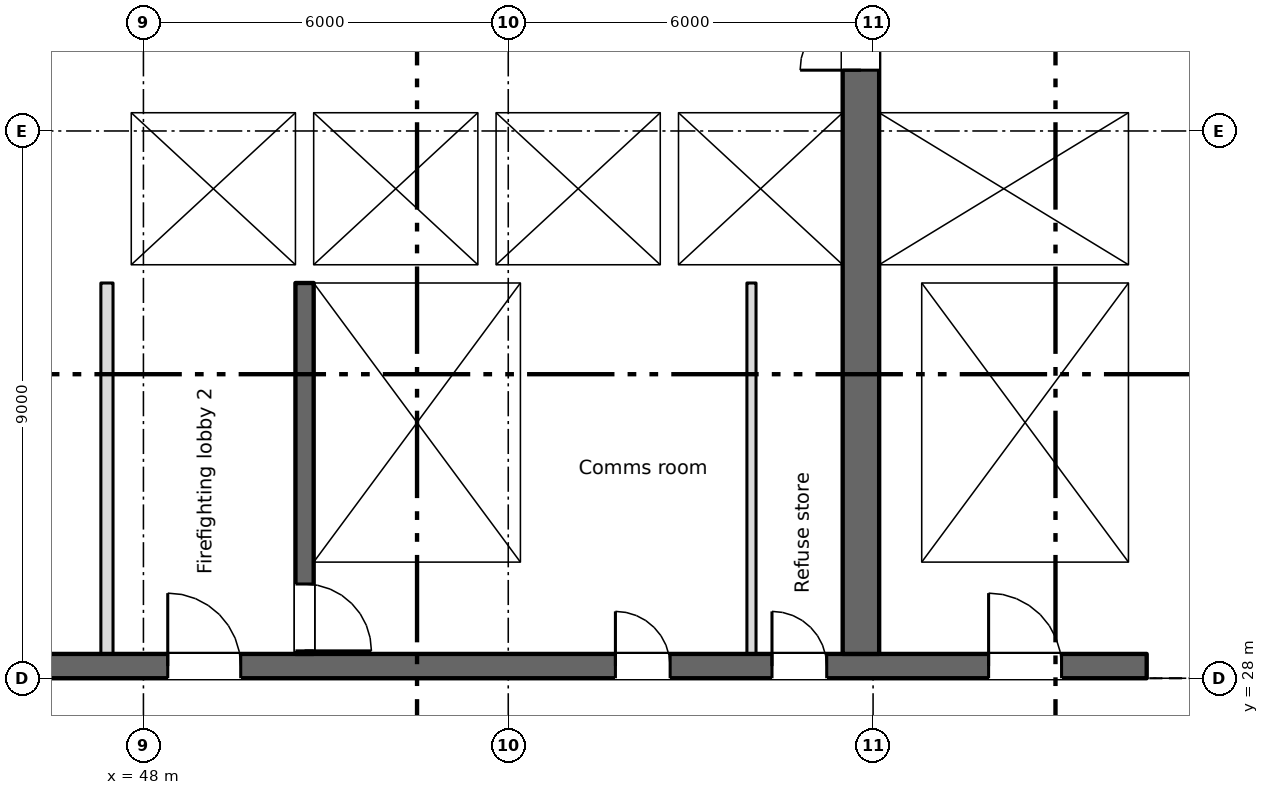
"""IFC4 building model, lengths in metres.
Left out: names, types, materials, properties, quantities, classifications, styles, units other than length and angle.
Written with IfcOpenShell. Run it as: python <this file> out.ifc"""

import sys

from ifc_helpers import new_model, si_unit, direction, frame, frame_2d, origin, place, context, subcontext, project, spatial, rectangle, extrude, element, fill, save


model = new_model("IFC4")
c1 = context("Model", 3, precision=1e-05, world=origin(), true_north=direction((0.0, 1.0)))
c2 = subcontext(c1, "Body", "Model", "MODEL_VIEW")
j1 = project(units=[si_unit("LENGTHUNIT", "METRE"), si_unit("PLANEANGLEUNIT", "RADIAN")], contexts=[c1])
p1 = place(None, origin())
s1 = spatial("IfcSite", under=j1, at=p1, CompositionType="ELEMENT")
p2 = place(p1, origin())
s2 = spatial("IfcBuilding", under=s1, at=p2, CompositionType="ELEMENT")
p3 = place(p2, frame((0.0, 0.0, 262.15)))
s3 = spatial("IfcBuildingStorey", under=s2, at=p3, CompositionType="ELEMENT", Elevation=262.15)
p4 = place(p3, frame((6.5, 28.2, 0.0), z_axis=(0.0, 0.0, 1.0), x_axis=(1.0, 0.0, 0.0)))
e1 = element("IfcWall", 1, at=p4, inside=s3, PredefinedType="SHEAR", context=c2, shape_type="SweptSolid", body=[
    extrude(rectangle(XDim=58.0, YDim=0.4, at=frame_2d((29.0, 0.0))), origin(), (0.0, 0.0, 1.0), 3.2),
])
p5 = place(p4, frame((12.262, 0.0, 0.0)))
e2 = element("IfcOpeningElement", 2, at=p5, cuts=e1, PredefinedType="OPENING", context=c2, shape_type="SweptSolid", body=[
    extrude(rectangle(XDim=0.9, YDim=2.1, at=frame_2d((0.45, 1.05))), frame((0.0, 0.21, 0.0), z_axis=(0.0, -1.0, 0.0), x_axis=(1.0, 0.0, 0.0)), (0.0, 0.0, 1.0), 0.42),
])
p6 = place(p4, frame((14.837, 0.0, 0.0)))
e3 = element("IfcOpeningElement", 3, at=p6, cuts=e1, PredefinedType="OPENING", context=c2, shape_type="SweptSolid", body=[
    extrude(rectangle(XDim=0.9, YDim=2.1, at=frame_2d((0.45, 1.05))), frame((0.0, 0.21, 0.0), z_axis=(0.0, -1.0, 0.0), x_axis=(1.0, 0.0, 0.0)), (0.0, 0.0, 1.0), 0.42),
])
p7 = place(p4, frame((49.262, 0.0, 0.0)))
e4 = element("IfcOpeningElement", 4, at=p7, cuts=e1, PredefinedType="OPENING", context=c2, shape_type="SweptSolid", body=[
    extrude(rectangle(XDim=0.9, YDim=2.1, at=frame_2d((0.45, 1.05))), frame((0.0, 0.21, 0.0), z_axis=(0.0, -1.0, 0.0), x_axis=(1.0, 0.0, 0.0)), (0.0, 0.0, 1.0), 0.42),
])
p8 = place(p4, frame((51.837, 0.0, 0.0)))
e5 = element("IfcOpeningElement", 5, at=p8, cuts=e1, PredefinedType="OPENING", context=c2, shape_type="SweptSolid", body=[
    extrude(rectangle(XDim=0.9, YDim=2.1, at=frame_2d((0.45, 1.05))), frame((0.0, 0.21, 0.0), z_axis=(0.0, -1.0, 0.0), x_axis=(1.0, 0.0, 0.0)), (0.0, 0.0, 1.0), 0.42),
])
p9 = place(p4, frame((1.55, 0.0, 0.0)))
e6 = element("IfcOpeningElement", 6, at=p9, cuts=e1, PredefinedType="OPENING", context=c2, shape_type="SweptSolid", body=[
    extrude(rectangle(XDim=0.9, YDim=2.1, at=frame_2d((0.45, 1.05))), frame((0.0, 0.21, 0.0), z_axis=(0.0, -1.0, 0.0), x_axis=(1.0, 0.0, 0.0)), (0.0, 0.0, 1.0), 0.42),
])
p10 = place(p4, frame((4.9, 0.0, 0.0)))
e7 = element("IfcOpeningElement", 7, at=p10, cuts=e1, PredefinedType="OPENING", context=c2, shape_type="SweptSolid", body=[
    extrude(rectangle(XDim=1.2, YDim=2.1, at=frame_2d((0.6, 1.05))), frame((0.0, 0.21, 0.0), z_axis=(0.0, -1.0, 0.0), x_axis=(1.0, 0.0, 0.0)), (0.0, 0.0, 1.0), 0.42),
])
p11 = place(p4, frame((31.9, 0.0, 0.0)))
e8 = element("IfcOpeningElement", 8, at=p11, cuts=e1, PredefinedType="OPENING", context=c2, shape_type="SweptSolid", body=[
    extrude(rectangle(XDim=1.2, YDim=2.1, at=frame_2d((0.6, 1.05))), frame((0.0, 0.21, 0.0), z_axis=(0.0, -1.0, 0.0), x_axis=(1.0, 0.0, 0.0)), (0.0, 0.0, 1.0), 0.42),
])
p12 = place(p4, frame((55.4, 0.0, 0.0)))
e9 = element("IfcOpeningElement", 9, at=p12, cuts=e1, PredefinedType="OPENING", context=c2, shape_type="SweptSolid", body=[
    extrude(rectangle(XDim=1.2, YDim=2.1, at=frame_2d((0.6, 1.05))), frame((0.0, 0.21, 0.0), z_axis=(0.0, -1.0, 0.0), x_axis=(1.0, 0.0, 0.0)), (0.0, 0.0, 1.0), 0.42),
])
p13 = place(p4, frame((21.9, 0.0, 0.0)))
e10 = element("IfcOpeningElement", 10, at=p13, cuts=e1, PredefinedType="OPENING", context=c2, shape_type="SweptSolid", body=[
    extrude(rectangle(XDim=1.2, YDim=2.1, at=frame_2d((0.6, 1.05))), frame((0.0, 0.21, 0.0), z_axis=(0.0, -1.0, 0.0), x_axis=(1.0, 0.0, 0.0)), (0.0, 0.0, 1.0), 0.42),
])
p14 = place(p4, frame((41.9, 0.0, 0.0)))
e11 = element("IfcOpeningElement", 11, at=p14, cuts=e1, PredefinedType="OPENING", context=c2, shape_type="SweptSolid", body=[
    extrude(rectangle(XDim=1.2, YDim=2.1, at=frame_2d((0.6, 1.05))), frame((0.0, 0.21, 0.0), z_axis=(0.0, -1.0, 0.0), x_axis=(1.0, 0.0, 0.0)), (0.0, 0.0, 1.0), 0.42),
])
p15 = place(p4, frame((25.05, 0.0, 0.0)))
e12 = element("IfcOpeningElement", 12, at=p15, cuts=e1, PredefinedType="OPENING", context=c2, shape_type="SweptSolid", body=[
    extrude(rectangle(XDim=2.4, YDim=2.1, at=frame_2d((1.2, 1.05))), frame((0.0, 0.21, 0.0), z_axis=(0.0, -1.0, 0.0), x_axis=(1.0, 0.0, 0.0)), (0.0, 0.0, 1.0), 0.42),
])
p16 = place(p4, frame((37.55, 0.0, 0.0)))
e13 = element("IfcOpeningElement", 13, at=p16, cuts=e1, PredefinedType="OPENING", context=c2, shape_type="SweptSolid", body=[
    extrude(rectangle(XDim=2.4, YDim=2.1, at=frame_2d((1.2, 1.05))), frame((0.0, 0.21, 0.0), z_axis=(0.0, -1.0, 0.0), x_axis=(1.0, 0.0, 0.0)), (0.0, 0.0, 1.0), 0.42),
])
p17 = place(p4, frame((8.25, 0.0, 0.0)))
e14 = element("IfcOpeningElement", 14, at=p17, cuts=e1, PredefinedType="OPENING", context=c2, shape_type="SweptSolid", body=[
    extrude(rectangle(XDim=2.4, YDim=2.1, at=frame_2d((1.2, 1.05))), frame((0.0, 0.21, 0.0), z_axis=(0.0, -1.0, 0.0), x_axis=(1.0, 0.0, 0.0)), (0.0, 0.0, 1.0), 0.42),
])
p18 = place(p4, frame((29.05, 0.0, 0.0)))
e15 = element("IfcOpeningElement", 15, at=p18, cuts=e1, PredefinedType="OPENING", context=c2, shape_type="SweptSolid", body=[
    extrude(rectangle(XDim=0.9, YDim=2.1, at=frame_2d((0.45, 1.05))), frame((0.0, 0.21, 0.0), z_axis=(0.0, -1.0, 0.0), x_axis=(1.0, 0.0, 0.0)), (0.0, 0.0, 1.0), 0.42),
])
p19 = place(p4, frame((35.05, 0.0, 0.0)))
e16 = element("IfcOpeningElement", 16, at=p19, cuts=e1, PredefinedType="OPENING", context=c2, shape_type="SweptSolid", body=[
    extrude(rectangle(XDim=0.9, YDim=2.1, at=frame_2d((0.45, 1.05))), frame((0.0, 0.21, 0.0), z_axis=(0.0, -1.0, 0.0), x_axis=(1.0, 0.0, 0.0)), (0.0, 0.0, 1.0), 0.42),
])
p20 = place(p3, frame((64.35, 34.8, 0.0), z_axis=(0.0, 0.0, 1.0), x_axis=(0.0, 1.0, 0.0)))
e17 = element("IfcWall", 17, at=p20, inside=s3, PredefinedType="SHEAR", context=c2, shape_type="SweptSolid", body=[
    extrude(rectangle(XDim=6.45, YDim=0.3, at=frame_2d((3.225, 0.0))), origin(), (0.0, 0.0, 1.0), 3.2),
])
p21 = place(p3, frame((59.8, 28.4, 0.0), z_axis=(0.0, 0.0, 1.0), x_axis=(0.0, 1.0, 0.0)))
e18 = element("IfcWall", 18, at=p21, inside=s3, PredefinedType="SHEAR", context=c2, shape_type="SweptSolid", body=[
    extrude(rectangle(XDim=15.1, YDim=0.6, at=frame_2d((7.55, 0.0))), origin(), (0.0, 0.0, 1.0), 3.2),
])
p22 = place(p21, frame((9.6, 0.0, 0.0)))
e19 = element("IfcOpeningElement", 19, at=p22, cuts=e18, PredefinedType="OPENING", context=c2, shape_type="SweptSolid", body=[
    extrude(rectangle(XDim=2.0, YDim=2.1, at=frame_2d((1.0, 1.05))), frame((0.0, 0.31, 0.0), z_axis=(0.0, -1.0, 0.0), x_axis=(1.0, 0.0, 0.0)), (0.0, 0.0, 1.0), 0.62),
])
p23 = place(p3, frame((50.65, 34.5, 0.0), z_axis=(0.0, 0.0, 1.0), x_axis=(0.0, -1.0, 0.0)))
e20 = element("IfcWall", 20, at=p23, inside=s3, PredefinedType="SHEAR", context=c2, shape_type="SweptSolid", body=[
    extrude(rectangle(XDim=6.1, YDim=0.3, at=frame_2d((3.05, 0.0))), origin(), (0.0, 0.0, 1.0), 3.2),
])
p24 = place(p23, frame((4.95, 0.0, 0.0)))
e21 = element("IfcOpeningElement", 21, at=p24, cuts=e20, PredefinedType="OPENING", context=c2, shape_type="SweptSolid", body=[
    extrude(rectangle(XDim=1.1, YDim=2.1, at=frame_2d((0.55, 1.05))), frame((0.0, 0.16, 0.0), z_axis=(0.0, -1.0, 0.0), x_axis=(1.0, 0.0, 0.0)), (0.0, 0.0, 1.0), 0.32),
])
p25 = place(p3, frame((54.35, 28.4, 0.0), z_axis=(0.0, 0.0, 1.0), x_axis=(0.0, 1.0, 0.0)))
e22 = element("IfcWall", 22, at=p25, inside=s3, PredefinedType="SHEAR", context=c2, shape_type="SweptSolid", body=[
    extrude(rectangle(XDim=6.1, YDim=0.3, at=frame_2d((3.05, 0.0))), origin(), (0.0, 0.0, 1.0), 3.2),
])
p26 = place(p3, frame((60.45, 28.4, 0.0), z_axis=(0.0, 0.0, 1.0), x_axis=(0.0, 1.0, 0.0)))
e23 = element("IfcWall", 23, at=p26, inside=s3, PredefinedType="SHEAR", context=c2, shape_type="SweptSolid", body=[
    extrude(rectangle(XDim=6.1, YDim=0.7, at=frame_2d((3.05, 0.0))), origin(), (0.0, 0.0, 1.0), 3.2),
])
p27 = place(p3, frame((64.35, 28.4, 0.0), z_axis=(0.0, 0.0, 1.0), x_axis=(0.0, 1.0, 0.0)))
e24 = element("IfcWall", 24, at=p27, inside=s3, PredefinedType="SHEAR", context=c2, shape_type="SweptSolid", body=[
    extrude(rectangle(XDim=6.1, YDim=0.3, at=frame_2d((3.05, 0.0))), origin(), (0.0, 0.0, 1.0), 3.2),
])
p28 = place(p3, frame((47.3, 34.65, 0.0), z_axis=(0.0, 0.0, 1.0), x_axis=(1.0, 0.0, 0.0)))
e25 = element("IfcWall", 25, at=p28, inside=s3, PredefinedType="SHEAR", context=c2, shape_type="SweptSolid", body=[
    extrude(rectangle(XDim=12.2, YDim=0.3, at=frame_2d((6.1, 0.0))), origin(), (0.0, 0.0, 1.0), 3.2),
])
p29 = place(p28, frame((1.3, 0.0, 0.0)))
e26 = element("IfcOpeningElement", 26, at=p29, cuts=e25, PredefinedType="OPENING", context=c2, shape_type="SweptSolid", body=[
    extrude(rectangle(XDim=1.1, YDim=2.1, at=frame_2d((0.55, 1.05))), frame((0.0, 0.16, 0.0), z_axis=(0.0, -1.0, 0.0), x_axis=(1.0, 0.0, 0.0)), (0.0, 0.0, 1.0), 0.32),
])
p30 = place(p3, frame((60.1, 34.65, 0.0), z_axis=(0.0, 0.0, 1.0), x_axis=(1.0, 0.0, 0.0)))
e27 = element("IfcWall", 27, at=p30, inside=s3, PredefinedType="SHEAR", context=c2, shape_type="SweptSolid", body=[
    extrude(rectangle(XDim=4.4, YDim=0.3, at=frame_2d((2.2, 0.0))), origin(), (0.0, 0.0, 1.0), 3.2),
])
p31 = place(p3, frame((47.3, 37.45, 0.0), z_axis=(0.0, 0.0, 1.0), x_axis=(1.0, 0.0, 0.0)))
e28 = element("IfcWall", 28, at=p31, inside=s3, PredefinedType="SHEAR", context=c2, shape_type="SweptSolid", body=[
    extrude(rectangle(XDim=12.2, YDim=0.3, at=frame_2d((6.1, 0.0))), origin(), (0.0, 0.0, 1.0), 3.2),
])
p32 = place(p31, frame((4.3, 0.0, 0.0)))
e29 = element("IfcOpeningElement", 29, at=p32, cuts=e28, PredefinedType="OPENING", context=c2, shape_type="SweptSolid", body=[
    extrude(rectangle(XDim=1.1, YDim=2.1, at=frame_2d((0.55, 1.05))), frame((0.0, 0.16, 0.0), z_axis=(0.0, -1.0, 0.0), x_axis=(1.0, 0.0, 0.0)), (0.0, 0.0, 1.0), 0.32),
])
p33 = place(p31, frame((7.3, 0.0, 0.0)))
e30 = element("IfcOpeningElement", 30, at=p33, cuts=e28, PredefinedType="OPENING", context=c2, shape_type="SweptSolid", body=[
    extrude(rectangle(XDim=1.1, YDim=2.1, at=frame_2d((0.55, 1.05))), frame((0.0, 0.16, 0.0), z_axis=(0.0, -1.0, 0.0), x_axis=(1.0, 0.0, 0.0)), (0.0, 0.0, 1.0), 0.32),
])
p34 = place(p31, frame((10.3, 0.0, 0.0)))
e31 = element("IfcOpeningElement", 31, at=p34, cuts=e28, PredefinedType="OPENING", context=c2, shape_type="SweptSolid", body=[
    extrude(rectangle(XDim=1.1, YDim=2.1, at=frame_2d((0.55, 1.05))), frame((0.0, 0.16, 0.0), z_axis=(0.0, -1.0, 0.0), x_axis=(1.0, 0.0, 0.0)), (0.0, 0.0, 1.0), 0.32),
])
p35 = place(p3, frame((60.1, 37.45, 0.0), z_axis=(0.0, 0.0, 1.0), x_axis=(1.0, 0.0, 0.0)))
e32 = element("IfcWall", 32, at=p35, inside=s3, PredefinedType="SHEAR", context=c2, shape_type="SweptSolid", body=[
    extrude(rectangle(XDim=4.1, YDim=0.3, at=frame_2d((2.05, 0.0))), origin(), (0.0, 0.0, 1.0), 3.2),
])
p36 = place(p35, frame((1.5, 0.0, 0.0)))
e33 = element("IfcOpeningElement", 33, at=p36, cuts=e32, PredefinedType="OPENING", context=c2, shape_type="SweptSolid", body=[
    extrude(rectangle(XDim=1.1, YDim=2.1, at=frame_2d((0.55, 1.05))), frame((0.0, 0.16, 0.0), z_axis=(0.0, -1.0, 0.0), x_axis=(1.0, 0.0, 0.0)), (0.0, 0.0, 1.0), 0.32),
])
p37 = place(p3, frame((47.55, 34.8, 0.0), z_axis=(0.0, 0.0, 1.0), x_axis=(0.0, 1.0, 0.0)))
e34 = element("IfcWall", 34, at=p37, inside=s3, PredefinedType="SHEAR", context=c2, shape_type="SweptSolid", body=[
    extrude(rectangle(XDim=2.5, YDim=0.5, at=frame_2d((1.25, 0.0))), origin(), (0.0, 0.0, 1.0), 3.2),
])
for number, where, z_axis, x_axis in (
    (35, (50.65, 34.8, 0.0), (0.0, 0.0, 1.0), (0.0, 1.0, 0.0)),
    (36, (53.65, 34.8, 0.0), (0.0, 0.0, 1.0), (0.0, 1.0, 0.0)),
    (37, (56.65, 34.8, 0.0), (0.0, 0.0, 1.0), (0.0, 1.0, 0.0)),
):
    element("IfcWall", number, at=place(p3, frame(where, z_axis=z_axis, x_axis=x_axis)), inside=s3, PredefinedType="SHEAR", context=c2, shape_type="SweptSolid", body=[
        extrude(rectangle(XDim=2.5, YDim=0.3, at=frame_2d((1.25, 0.0))), origin(), (0.0, 0.0, 1.0), 3.2),
    ])
p38 = place(p3, frame((47.4, 28.4, 0.0), z_axis=(0.0, 0.0, 1.0), x_axis=(0.0, 1.0, 0.0)))
e38 = element("IfcWall", 38, at=p38, inside=s3, PredefinedType="PARTITIONING", context=c2, shape_type="SweptSolid", body=[
    extrude(rectangle(XDim=6.1, YDim=0.2, at=frame_2d((3.05, 0.0))), origin(), (0.0, 0.0, 1.0), 3.2),
])
p39 = place(p3, frame((58.0, 28.4, 0.0), z_axis=(0.0, 0.0, 1.0), x_axis=(0.0, 1.0, 0.0)))
e39 = element("IfcWall", 39, at=p39, inside=s3, PredefinedType="PARTITIONING", context=c2, shape_type="SweptSolid", body=[
    extrude(rectangle(XDim=6.1, YDim=0.15, at=frame_2d((3.05, 0.0))), origin(), (0.0, 0.0, 1.0), 3.2),
])
p40 = place(p7, origin())
e40 = element("IfcDoor", 40, at=p40, inside=s3, OperationType="SINGLE_SWING_LEFT", PredefinedType="DOOR", context=c2, shape_type="SweptSolid", body=[
    extrude(rectangle(XDim=0.9, YDim=2.1, at=frame_2d((0.45, 1.05))), frame((0.0, 0.025, 0.0), z_axis=(0.0, -1.0, 0.0), x_axis=(1.0, 0.0, 0.0)), (0.0, 0.0, 1.0), 0.05),
])
fill(e4, e40)
p41 = place(p8, origin())
e41 = element("IfcDoor", 41, at=p41, inside=s3, OperationType="SINGLE_SWING_LEFT", PredefinedType="DOOR", context=c2, shape_type="SweptSolid", body=[
    extrude(rectangle(XDim=0.9, YDim=2.1, at=frame_2d((0.45, 1.05))), frame((0.0, 0.025, 0.0), z_axis=(0.0, -1.0, 0.0), x_axis=(1.0, 0.0, 0.0)), (0.0, 0.0, 1.0), 0.05),
])
fill(e5, e41)
p42 = place(p32, origin())
e42 = element("IfcDoor", 42, at=p42, inside=s3, OperationType="SLIDING_TO_LEFT", PredefinedType="DOOR", context=c2, shape_type="SweptSolid", body=[
    extrude(rectangle(XDim=1.1, YDim=2.1, at=frame_2d((0.55, 1.05))), frame((0.0, 0.025, 0.0), z_axis=(0.0, -1.0, 0.0), x_axis=(1.0, 0.0, 0.0)), (0.0, 0.0, 1.0), 0.05),
])
fill(e29, e42)
p43 = place(p33, origin())
e43 = element("IfcDoor", 43, at=p43, inside=s3, OperationType="SLIDING_TO_LEFT", PredefinedType="DOOR", context=c2, shape_type="SweptSolid", body=[
    extrude(rectangle(XDim=1.1, YDim=2.1, at=frame_2d((0.55, 1.05))), frame((0.0, 0.025, 0.0), z_axis=(0.0, -1.0, 0.0), x_axis=(1.0, 0.0, 0.0)), (0.0, 0.0, 1.0), 0.05),
])
fill(e30, e43)
p44 = place(p34, origin())
e44 = element("IfcDoor", 44, at=p44, inside=s3, OperationType="SLIDING_TO_LEFT", PredefinedType="DOOR", context=c2, shape_type="SweptSolid", body=[
    extrude(rectangle(XDim=1.1, YDim=2.1, at=frame_2d((0.55, 1.05))), frame((0.0, 0.025, 0.0), z_axis=(0.0, -1.0, 0.0), x_axis=(1.0, 0.0, 0.0)), (0.0, 0.0, 1.0), 0.05),
])
fill(e31, e44)
p45 = place(p36, origin())
e45 = element("IfcDoor", 45, at=p45, inside=s3, OperationType="SLIDING_TO_LEFT", PredefinedType="DOOR", context=c2, shape_type="SweptSolid", body=[
    extrude(rectangle(XDim=1.1, YDim=2.1, at=frame_2d((0.55, 1.05))), frame((0.0, 0.025, 0.0), z_axis=(0.0, -1.0, 0.0), x_axis=(1.0, 0.0, 0.0)), (0.0, 0.0, 1.0), 0.05),
])
fill(e33, e45)
p46 = place(p29, origin())
e46 = element("IfcDoor", 46, at=p46, inside=s3, OperationType="SLIDING_TO_LEFT", PredefinedType="DOOR", context=c2, shape_type="SweptSolid", body=[
    extrude(rectangle(XDim=1.1, YDim=2.1, at=frame_2d((0.55, 1.05))), frame((0.0, 0.025, 0.0), z_axis=(0.0, -1.0, 0.0), x_axis=(1.0, 0.0, 0.0)), (0.0, 0.0, 1.0), 0.05),
])
fill(e26, e46)
p47 = place(p24, origin())
e47 = element("IfcDoor", 47, at=p47, inside=s3, OperationType="SINGLE_SWING_RIGHT", PredefinedType="DOOR", context=c2, shape_type="SweptSolid", body=[
    extrude(rectangle(XDim=1.1, YDim=2.1, at=frame_2d((0.55, 1.05))), frame((0.0, 0.025, 0.0), z_axis=(0.0, -1.0, 0.0), x_axis=(1.0, 0.0, 0.0)), (0.0, 0.0, 1.0), 0.05),
])
fill(e21, e47)
p48 = place(p12, origin())
e48 = element("IfcDoor", 48, at=p48, inside=s3, OperationType="SINGLE_SWING_LEFT", PredefinedType="DOOR", context=c2, shape_type="SweptSolid", body=[
    extrude(rectangle(XDim=1.2, YDim=2.1, at=frame_2d((0.6, 1.05))), frame((0.0, 0.025, 0.0), z_axis=(0.0, -1.0, 0.0), x_axis=(1.0, 0.0, 0.0)), (0.0, 0.0, 1.0), 0.05),
])
fill(e9, e48)
p49 = place(p14, origin())
e49 = element("IfcDoor", 49, at=p49, inside=s3, OperationType="SINGLE_SWING_LEFT", PredefinedType="DOOR", context=c2, shape_type="SweptSolid", body=[
    extrude(rectangle(XDim=1.2, YDim=2.1, at=frame_2d((0.6, 1.05))), frame((0.0, 0.025, 0.0), z_axis=(0.0, -1.0, 0.0), x_axis=(1.0, 0.0, 0.0)), (0.0, 0.0, 1.0), 0.05),
])
fill(e11, e49)
p50 = place(p22, origin())
e50 = element("IfcDoor", 50, at=p50, inside=s3, OperationType="DOUBLE_DOOR_SINGLE_SWING", PredefinedType="DOOR", context=c2, shape_type="SweptSolid", body=[
    extrude(rectangle(XDim=2.0, YDim=2.1, at=frame_2d((1.0, 1.05))), frame((0.0, 0.025, 0.0), z_axis=(0.0, -1.0, 0.0), x_axis=(1.0, 0.0, 0.0)), (0.0, 0.0, 1.0), 0.05),
])
fill(e19, e50)
save(model, sys.argv[1])
